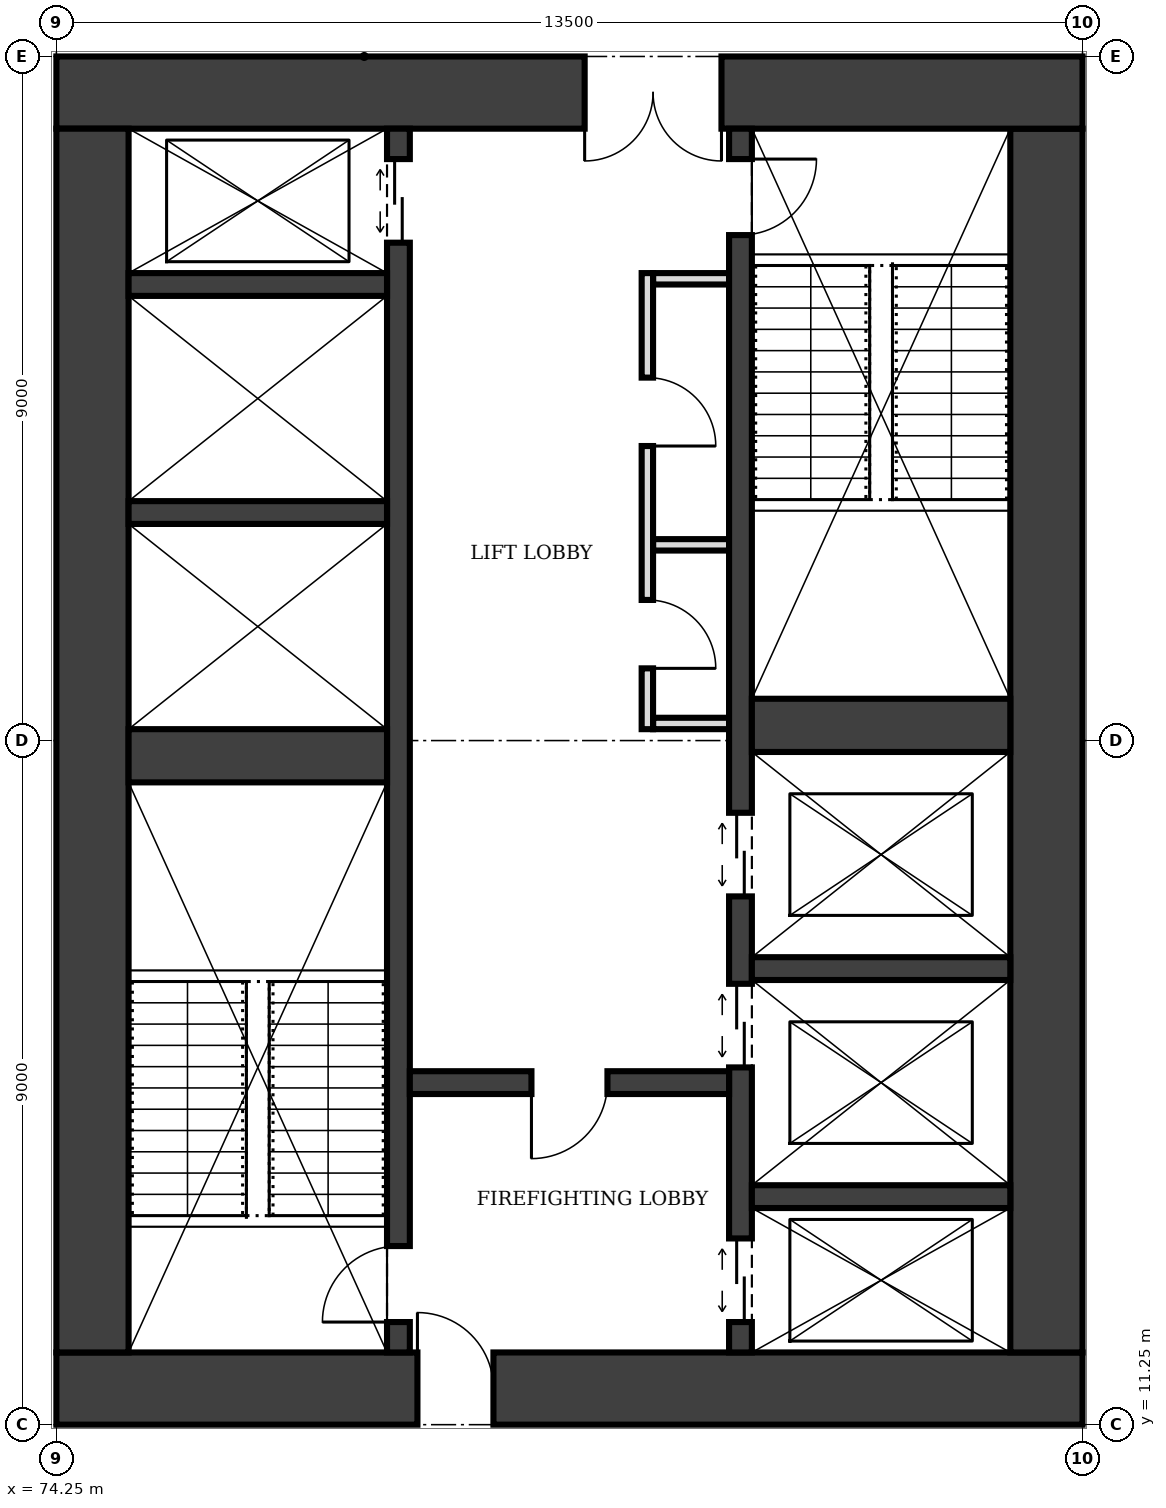
"""IFC4 building model, lengths in metres.
Left out: names, types, materials, properties, quantities, classifications, styles, units other than length and angle.
Written with IfcOpenShell. Run it as: python <this file> out.ifc"""

import sys

from ifc_helpers import new_model, si_unit, direction, frame, frame_2d, origin, place, context, subcontext, project, spatial, rectangle, extrude, element, fill, save


model = new_model("IFC4")
c1 = context("Model", 3, precision=1e-05, world=origin(), true_north=direction((0.0, 1.0)))
c2 = subcontext(c1, "Body", "Model", "MODEL_VIEW")
j1 = project(units=[si_unit("LENGTHUNIT", "METRE"), si_unit("PLANEANGLEUNIT", "RADIAN")], contexts=[c1])
p1 = place(None, origin())
s1 = spatial("IfcSite", under=j1, at=p1, CompositionType="ELEMENT")
p2 = place(p1, origin())
s2 = spatial("IfcBuilding", under=s1, at=p2, CompositionType="ELEMENT")
p3 = place(p2, frame((0.0, 0.0, 109.0)))
s3 = spatial("IfcBuildingStorey", under=s2, at=p3, CompositionType="ELEMENT", Elevation=109.0)
p4 = place(p3, frame((74.25, 11.725, 0.0), z_axis=(0.0, 0.0, 1.0), x_axis=(1.0, 0.0, 0.0)))
e1 = element("IfcWall", 1, at=p4, inside=s3, PredefinedType="SHEAR", context=c2, shape_type="SweptSolid", body=[
    extrude(rectangle(XDim=13.5, YDim=0.95, at=frame_2d((6.75, 0.0))), origin(), (0.0, 0.0, 1.0), 4.0),
])
p5 = place(p4, frame((4.75, 0.0, 0.0)))
e2 = element("IfcOpeningElement", 2, at=p5, cuts=e1, PredefinedType="OPENING", context=c2, shape_type="SweptSolid", body=[
    extrude(rectangle(XDim=1.0, YDim=2.1, at=frame_2d((0.5, 1.05))), frame((0.0, 0.485, 0.0), z_axis=(0.0, -1.0, 0.0), x_axis=(1.0, 0.0, 0.0)), (0.0, 0.0, 1.0), 0.97),
])
p6 = place(p3, frame((87.275, 12.2, 0.0), z_axis=(0.0, 0.0, 1.0), x_axis=(0.0, 1.0, 0.0)))
e3 = element("IfcWall", 3, at=p6, inside=s3, PredefinedType="SHEAR", context=c2, shape_type="SweptSolid", body=[
    extrude(rectangle(XDim=16.1, YDim=0.95, at=frame_2d((8.05, 0.0))), origin(), (0.0, 0.0, 1.0), 4.0),
])
p7 = place(p3, frame((87.75, 28.775, 0.0), z_axis=(0.0, 0.0, 1.0), x_axis=(-1.0, 0.0, 0.0)))
e4 = element("IfcWall", 4, at=p7, inside=s3, PredefinedType="SHEAR", context=c2, shape_type="SweptSolid", body=[
    extrude(rectangle(XDim=13.5, YDim=0.95, at=frame_2d((6.75, 0.0))), origin(), (0.0, 0.0, 1.0), 4.0),
])
p8 = place(p7, frame((4.75, 0.0, 0.0)))
e5 = element("IfcOpeningElement", 5, at=p8, cuts=e4, PredefinedType="OPENING", context=c2, shape_type="SweptSolid", body=[
    extrude(rectangle(XDim=1.8, YDim=2.1, at=frame_2d((0.9, 1.05))), frame((0.0, 0.485, 0.0), z_axis=(0.0, -1.0, 0.0), x_axis=(1.0, 0.0, 0.0)), (0.0, 0.0, 1.0), 0.97),
])
p9 = place(p3, frame((74.725, 28.3, 0.0), z_axis=(0.0, 0.0, 1.0), x_axis=(0.0, -1.0, 0.0)))
e6 = element("IfcWall", 6, at=p9, inside=s3, PredefinedType="SHEAR", context=c2, shape_type="SweptSolid", body=[
    extrude(rectangle(XDim=16.1, YDim=0.95, at=frame_2d((8.05, 0.0))), origin(), (0.0, 0.0, 1.0), 4.0),
])
p10 = place(p3, frame((78.75, 12.2, 0.0), z_axis=(0.0, 0.0, 1.0), x_axis=(0.0, 1.0, 0.0)))
e7 = element("IfcWall", 7, at=p10, inside=s3, PredefinedType="SHEAR", context=c2, shape_type="SweptSolid", body=[
    extrude(rectangle(XDim=16.1, YDim=0.3, at=frame_2d((8.05, 0.0))), origin(), (0.0, 0.0, 1.0), 4.0),
])
p11 = place(p10, frame((0.4, 0.0, 0.0)))
e8 = element("IfcOpeningElement", 8, at=p11, cuts=e7, PredefinedType="OPENING", context=c2, shape_type="SweptSolid", body=[
    extrude(rectangle(XDim=1.0, YDim=2.1, at=frame_2d((0.5, 1.05))), frame((0.0, 0.16, 0.0), z_axis=(0.0, -1.0, 0.0), x_axis=(1.0, 0.0, 0.0)), (0.0, 0.0, 1.0), 0.32),
])
p12 = place(p10, frame((14.6, 0.0, 0.0)))
e9 = element("IfcOpeningElement", 9, at=p12, cuts=e7, PredefinedType="OPENING", context=c2, shape_type="SweptSolid", body=[
    extrude(rectangle(XDim=1.1, YDim=2.1, at=frame_2d((0.55, 1.05))), frame((0.0, 0.16, 0.0), z_axis=(0.0, -1.0, 0.0), x_axis=(1.0, 0.0, 0.0)), (0.0, 0.0, 1.0), 0.32),
])
p13 = place(p3, frame((83.25, 12.2, 0.0), z_axis=(0.0, 0.0, 1.0), x_axis=(0.0, 1.0, 0.0)))
e10 = element("IfcWall", 10, at=p13, inside=s3, PredefinedType="SHEAR", context=c2, shape_type="SweptSolid", body=[
    extrude(rectangle(XDim=16.1, YDim=0.3, at=frame_2d((8.05, 0.0))), origin(), (0.0, 0.0, 1.0), 4.0),
])
p14 = place(p13, frame((14.7, 0.0, 0.0)))
e11 = element("IfcOpeningElement", 11, at=p14, cuts=e10, PredefinedType="OPENING", context=c2, shape_type="SweptSolid", body=[
    extrude(rectangle(XDim=1.0, YDim=2.1, at=frame_2d((0.5, 1.05))), frame((0.0, 0.16, 0.0), z_axis=(0.0, -1.0, 0.0), x_axis=(1.0, 0.0, 0.0)), (0.0, 0.0, 1.0), 0.32),
])
p15 = place(p13, frame((0.4, 0.0, 0.0)))
e12 = element("IfcOpeningElement", 12, at=p15, cuts=e10, PredefinedType="OPENING", context=c2, shape_type="SweptSolid", body=[
    extrude(rectangle(XDim=1.1, YDim=2.1, at=frame_2d((0.55, 1.05))), frame((0.0, 0.16, 0.0), z_axis=(0.0, -1.0, 0.0), x_axis=(1.0, 0.0, 0.0)), (0.0, 0.0, 1.0), 0.32),
])
p16 = place(p13, frame((3.75, 0.0, 0.0)))
e13 = element("IfcOpeningElement", 13, at=p16, cuts=e10, PredefinedType="OPENING", context=c2, shape_type="SweptSolid", body=[
    extrude(rectangle(XDim=1.1, YDim=2.1, at=frame_2d((0.55, 1.05))), frame((0.0, 0.16, 0.0), z_axis=(0.0, -1.0, 0.0), x_axis=(1.0, 0.0, 0.0)), (0.0, 0.0, 1.0), 0.32),
])
p17 = place(p13, frame((6.0, 0.0, 0.0)))
e14 = element("IfcOpeningElement", 14, at=p17, cuts=e10, PredefinedType="OPENING", context=c2, shape_type="SweptSolid", body=[
    extrude(rectangle(XDim=1.1, YDim=2.1, at=frame_2d((0.55, 1.05))), frame((0.0, 0.16, 0.0), z_axis=(0.0, -1.0, 0.0), x_axis=(1.0, 0.0, 0.0)), (0.0, 0.0, 1.0), 0.32),
])
p18 = place(p3, frame((75.2, 20.05, 0.0), z_axis=(0.0, 0.0, 1.0), x_axis=(1.0, 0.0, 0.0)))
e15 = element("IfcWall", 15, at=p18, inside=s3, PredefinedType="SHEAR", context=c2, shape_type="SweptSolid", body=[
    extrude(rectangle(XDim=3.4, YDim=0.7, at=frame_2d((1.7, 0.0))), origin(), (0.0, 0.0, 1.0), 4.0),
])
p19 = place(p3, frame((78.9, 15.75, 0.0), z_axis=(0.0, 0.0, 1.0), x_axis=(1.0, 0.0, 0.0)))
e16 = element("IfcWall", 16, at=p19, inside=s3, PredefinedType="SHEAR", context=c2, shape_type="SweptSolid", body=[
    extrude(rectangle(XDim=4.2, YDim=0.3, at=frame_2d((2.1, 0.0))), origin(), (0.0, 0.0, 1.0), 4.0),
])
p20 = place(p19, frame((1.6, 0.0, 0.0)))
e17 = element("IfcOpeningElement", 17, at=p20, cuts=e16, PredefinedType="OPENING", context=c2, shape_type="SweptSolid", body=[
    extrude(rectangle(XDim=1.0, YDim=2.1, at=frame_2d((0.5, 1.05))), frame((0.0, 0.16, 0.0), z_axis=(0.0, -1.0, 0.0), x_axis=(1.0, 0.0, 0.0)), (0.0, 0.0, 1.0), 0.32),
])
for number, where, z_axis, x_axis in (
    (18, (83.4, 14.25, 0.0), (0.0, 0.0, 1.0), (1.0, 0.0, 0.0)),
    (19, (83.4, 17.25, 0.0), (0.0, 0.0, 1.0), (1.0, 0.0, 0.0)),
):
    element("IfcWall", number, at=place(p3, frame(where, z_axis=z_axis, x_axis=x_axis)), inside=s3, PredefinedType="SHEAR", context=c2, shape_type="SweptSolid", body=[
        extrude(rectangle(XDim=3.4, YDim=0.3, at=frame_2d((1.7, 0.0))), origin(), (0.0, 0.0, 1.0), 4.0),
    ])
p21 = place(p3, frame((83.4, 20.45, 0.0), z_axis=(0.0, 0.0, 1.0), x_axis=(1.0, 0.0, 0.0)))
e20 = element("IfcWall", 20, at=p21, inside=s3, PredefinedType="SHEAR", context=c2, shape_type="SweptSolid", body=[
    extrude(rectangle(XDim=3.4, YDim=0.7, at=frame_2d((1.7, 0.0))), origin(), (0.0, 0.0, 1.0), 4.0),
])
for number, where, z_axis, x_axis in (
    (21, (75.2, 23.25, 0.0), (0.0, 0.0, 1.0), (1.0, 0.0, 0.0)),
    (22, (75.2, 26.25, 0.0), (0.0, 0.0, 1.0), (1.0, 0.0, 0.0)),
):
    element("IfcWall", number, at=place(p3, frame(where, z_axis=z_axis, x_axis=x_axis)), inside=s3, PredefinedType="SHEAR", context=c2, shape_type="SweptSolid", body=[
        extrude(rectangle(XDim=3.4, YDim=0.3, at=frame_2d((1.7, 0.0))), origin(), (0.0, 0.0, 1.0), 4.0),
    ])
p22 = place(p3, frame((82.025, 20.4, 0.0), z_axis=(0.0, 0.0, 1.0), x_axis=(0.0, 1.0, 0.0)))
e23 = element("IfcWall", 23, at=p22, inside=s3, PredefinedType="PARTITIONING", context=c2, shape_type="SweptSolid", body=[
    extrude(rectangle(XDim=6.0, YDim=0.15, at=frame_2d((3.0, 0.0))), origin(), (0.0, 0.0, 1.0), 3.75),
])
p23 = place(p22, frame((0.8, 0.0, 0.0)))
e24 = element("IfcOpeningElement", 24, at=p23, cuts=e23, PredefinedType="OPENING", context=c2, shape_type="SweptSolid", body=[
    extrude(rectangle(XDim=0.9, YDim=2.1, at=frame_2d((0.45, 1.05))), frame((0.0, 0.085, 0.0), z_axis=(0.0, -1.0, 0.0), x_axis=(1.0, 0.0, 0.0)), (0.0, 0.0, 1.0), 0.17),
])
p24 = place(p22, frame((3.725, 0.0, 0.0)))
e25 = element("IfcOpeningElement", 25, at=p24, cuts=e23, PredefinedType="OPENING", context=c2, shape_type="SweptSolid", body=[
    extrude(rectangle(XDim=0.9, YDim=2.1, at=frame_2d((0.45, 1.05))), frame((0.0, 0.085, 0.0), z_axis=(0.0, -1.0, 0.0), x_axis=(1.0, 0.0, 0.0)), (0.0, 0.0, 1.0), 0.17),
])
for number, where, z_axis, x_axis in (
    (26, (82.1, 20.475, 0.0), (0.0, 0.0, 1.0), (1.0, 0.0, 0.0)),
    (27, (82.1, 22.825, 0.0), (0.0, 0.0, 1.0), (1.0, 0.0, 0.0)),
    (28, (82.1, 26.325, 0.0), (0.0, 0.0, 1.0), (1.0, 0.0, 0.0)),
):
    element("IfcWall", number, at=place(p3, frame(where, z_axis=z_axis, x_axis=x_axis)), inside=s3, PredefinedType="PARTITIONING", context=c2, shape_type="SweptSolid", body=[
        extrude(rectangle(XDim=1.0, YDim=0.15, at=frame_2d((0.5, 0.0))), origin(), (0.0, 0.0, 1.0), 3.75),
    ])
p25 = place(p5, origin())
e29 = element("IfcDoor", 29, at=p25, inside=s3, OperationType="SINGLE_SWING_LEFT", PredefinedType="DOOR", context=c2, shape_type="SweptSolid", body=[
    extrude(rectangle(XDim=1.0, YDim=2.1, at=frame_2d((0.5, 1.05))), frame((0.0, 0.025, 0.0), z_axis=(0.0, -1.0, 0.0), x_axis=(1.0, 0.0, 0.0)), (0.0, 0.0, 1.0), 0.05),
])
fill(e2, e29)
p26 = place(p8, origin())
e30 = element("IfcDoor", 30, at=p26, inside=s3, OperationType="DOUBLE_DOOR_SINGLE_SWING", PredefinedType="DOOR", context=c2, shape_type="SweptSolid", body=[
    extrude(rectangle(XDim=1.8, YDim=2.1, at=frame_2d((0.9, 1.05))), frame((0.0, 0.025, 0.0), z_axis=(0.0, -1.0, 0.0), x_axis=(1.0, 0.0, 0.0)), (0.0, 0.0, 1.0), 0.05),
])
fill(e5, e30)
p27 = place(p20, frame((1.0, 0.0, 0.0), z_axis=(0.0, 0.0, 1.0), x_axis=(-1.0, 0.0, 0.0)))
e31 = element("IfcDoor", 31, at=p27, inside=s3, OperationType="SINGLE_SWING_RIGHT", PredefinedType="DOOR", context=c2, shape_type="SweptSolid", body=[
    extrude(rectangle(XDim=1.0, YDim=2.1, at=frame_2d((0.5, 1.05))), frame((0.0, 0.025, 0.0), z_axis=(0.0, -1.0, 0.0), x_axis=(1.0, 0.0, 0.0)), (0.0, 0.0, 1.0), 0.05),
])
fill(e17, e31)
p28 = place(p11, origin())
e32 = element("IfcDoor", 32, at=p28, inside=s3, OperationType="SINGLE_SWING_LEFT", PredefinedType="DOOR", context=c2, shape_type="SweptSolid", body=[
    extrude(rectangle(XDim=1.0, YDim=2.1, at=frame_2d((0.5, 1.05))), frame((0.0, 0.025, 0.0), z_axis=(0.0, -1.0, 0.0), x_axis=(1.0, 0.0, 0.0)), (0.0, 0.0, 1.0), 0.05),
])
fill(e8, e32)
p29 = place(p14, frame((1.0, 0.0, 0.0), z_axis=(0.0, 0.0, 1.0), x_axis=(-1.0, 0.0, 0.0)))
e33 = element("IfcDoor", 33, at=p29, inside=s3, OperationType="SINGLE_SWING_LEFT", PredefinedType="DOOR", context=c2, shape_type="SweptSolid", body=[
    extrude(rectangle(XDim=1.0, YDim=2.1, at=frame_2d((0.5, 1.05))), frame((0.0, 0.025, 0.0), z_axis=(0.0, -1.0, 0.0), x_axis=(1.0, 0.0, 0.0)), (0.0, 0.0, 1.0), 0.05),
])
fill(e11, e33)
p30 = place(p15, origin())
e34 = element("IfcDoor", 34, at=p30, inside=s3, OperationType="DOUBLE_DOOR_SLIDING", PredefinedType="DOOR", context=c2, shape_type="SweptSolid", body=[
    extrude(rectangle(XDim=1.1, YDim=2.1, at=frame_2d((0.55, 1.05))), frame((0.0, 0.025, 0.0), z_axis=(0.0, -1.0, 0.0), x_axis=(1.0, 0.0, 0.0)), (0.0, 0.0, 1.0), 0.05),
])
fill(e12, e34)
p31 = place(p12, origin())
e35 = element("IfcDoor", 35, at=p31, inside=s3, OperationType="DOUBLE_DOOR_SLIDING", PredefinedType="DOOR", context=c2, shape_type="SweptSolid", body=[
    extrude(rectangle(XDim=1.1, YDim=2.1, at=frame_2d((0.55, 1.05))), frame((0.0, 0.025, 0.0), z_axis=(0.0, -1.0, 0.0), x_axis=(1.0, 0.0, 0.0)), (0.0, 0.0, 1.0), 0.05),
])
fill(e9, e35)
p32 = place(p16, origin())
e36 = element("IfcDoor", 36, at=p32, inside=s3, OperationType="DOUBLE_DOOR_SLIDING", PredefinedType="DOOR", context=c2, shape_type="SweptSolid", body=[
    extrude(rectangle(XDim=1.1, YDim=2.1, at=frame_2d((0.55, 1.05))), frame((0.0, 0.025, 0.0), z_axis=(0.0, -1.0, 0.0), x_axis=(1.0, 0.0, 0.0)), (0.0, 0.0, 1.0), 0.05),
])
fill(e13, e36)
p33 = place(p17, origin())
e37 = element("IfcDoor", 37, at=p33, inside=s3, OperationType="DOUBLE_DOOR_SLIDING", PredefinedType="DOOR", context=c2, shape_type="SweptSolid", body=[
    extrude(rectangle(XDim=1.1, YDim=2.1, at=frame_2d((0.55, 1.05))), frame((0.0, 0.025, 0.0), z_axis=(0.0, -1.0, 0.0), x_axis=(1.0, 0.0, 0.0)), (0.0, 0.0, 1.0), 0.05),
])
fill(e14, e37)
p34 = place(p23, frame((0.9, 0.0, 0.0), z_axis=(0.0, 0.0, 1.0), x_axis=(-1.0, 0.0, 0.0)))
e38 = element("IfcDoor", 38, at=p34, inside=s3, OperationType="SINGLE_SWING_RIGHT", PredefinedType="DOOR", context=c2, shape_type="SweptSolid", body=[
    extrude(rectangle(XDim=0.9, YDim=2.1, at=frame_2d((0.45, 1.05))), frame((0.0, 0.025, 0.0), z_axis=(0.0, -1.0, 0.0), x_axis=(1.0, 0.0, 0.0)), (0.0, 0.0, 1.0), 0.05),
])
fill(e24, e38)
p35 = place(p24, frame((0.9, 0.0, 0.0), z_axis=(0.0, 0.0, 1.0), x_axis=(-1.0, 0.0, 0.0)))
e39 = element("IfcDoor", 39, at=p35, inside=s3, OperationType="SINGLE_SWING_RIGHT", PredefinedType="DOOR", context=c2, shape_type="SweptSolid", body=[
    extrude(rectangle(XDim=0.9, YDim=2.1, at=frame_2d((0.45, 1.05))), frame((0.0, 0.025, 0.0), z_axis=(0.0, -1.0, 0.0), x_axis=(1.0, 0.0, 0.0)), (0.0, 0.0, 1.0), 0.05),
])
fill(e25, e39)
save(model, sys.argv[1])
